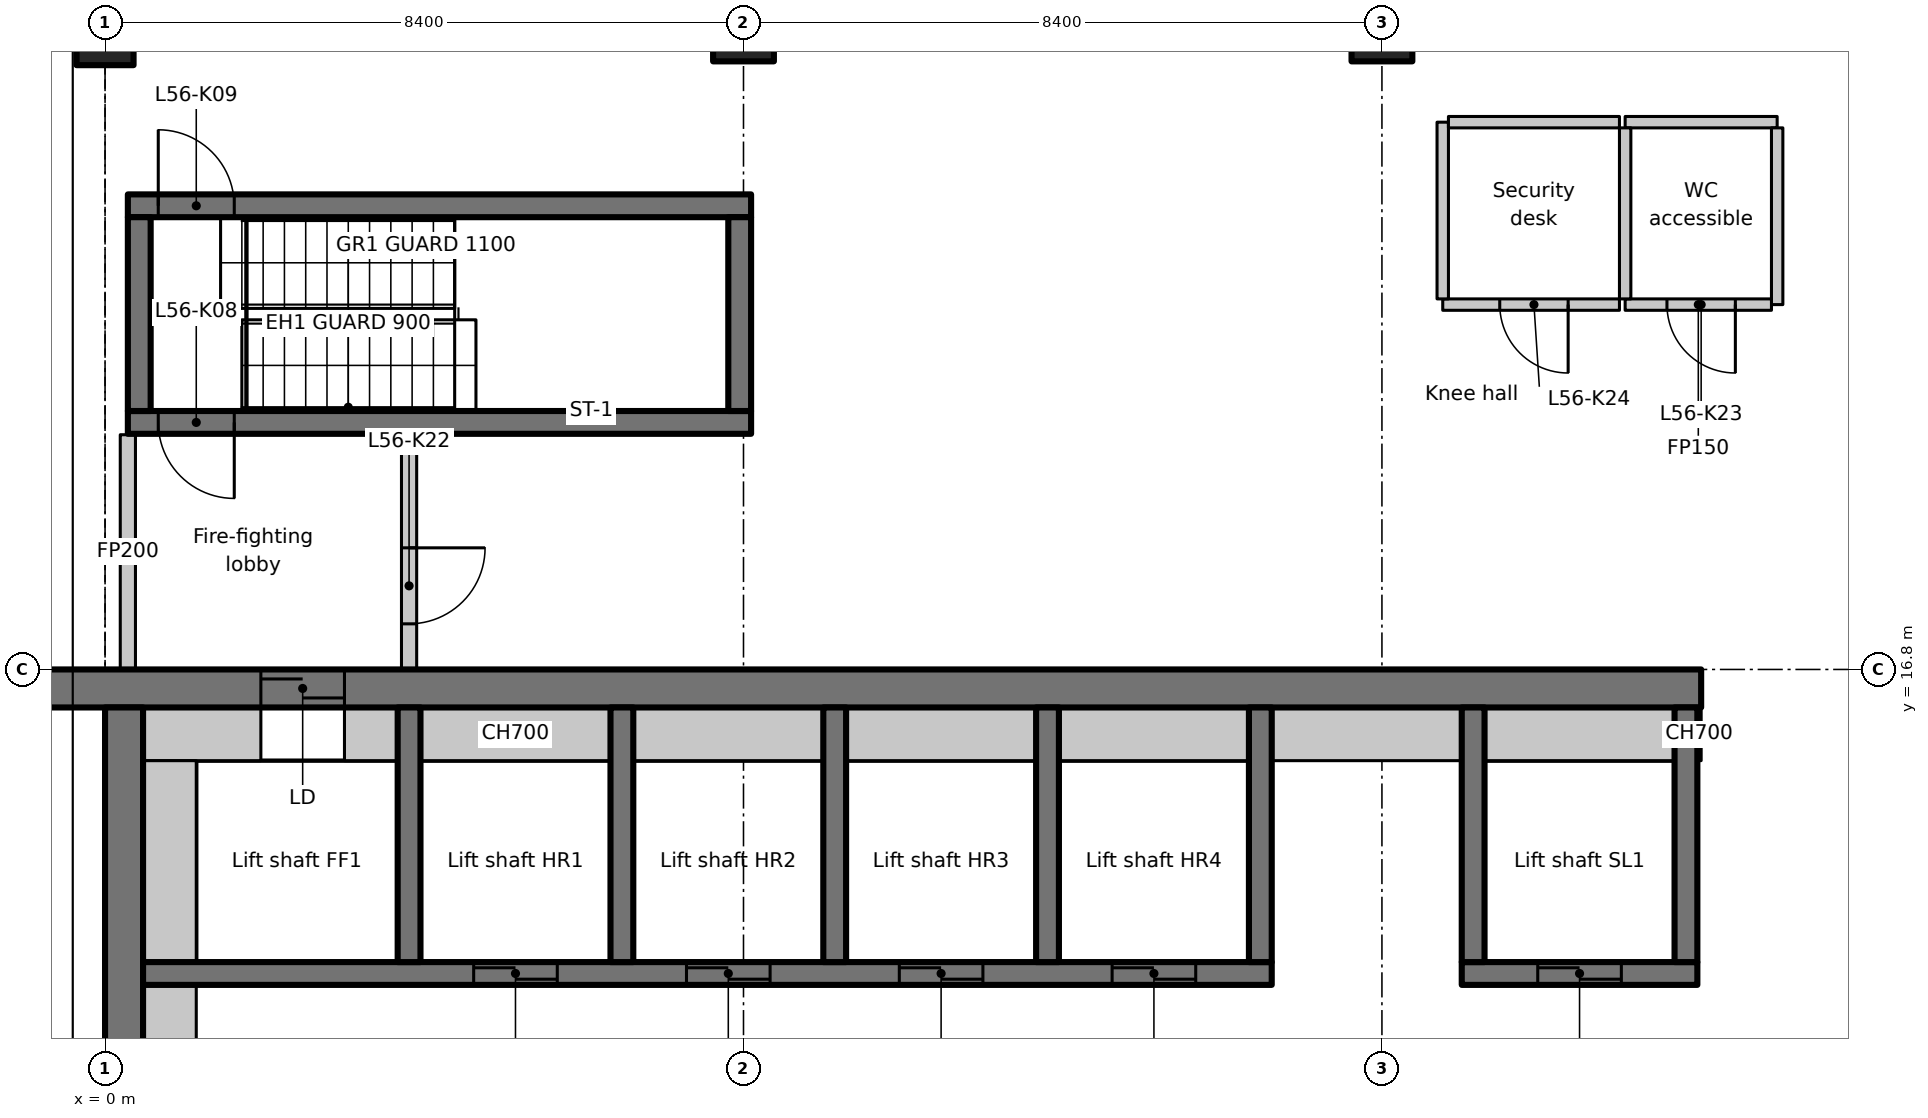
"""IFC4 building model, lengths in metres.
Left out: names, types, materials, properties, quantities, classifications, styles, units other than length and angle.
Written with IfcOpenShell. Run it as: python <this file> out.ifc"""

import sys

from ifc_helpers import new_model, si_unit, direction, frame, frame_2d, origin, origin_2d, place, context, subcontext, project, spatial, rectangle, extrude, element, fill, save


model = new_model("IFC4")
c1 = context("Model", 3, precision=1e-05, world=origin(), true_north=direction((0.0, 1.0)))
c2 = subcontext(c1, "Body", "Model", "MODEL_VIEW")
j1 = project(units=[si_unit("LENGTHUNIT", "METRE"), si_unit("PLANEANGLEUNIT", "RADIAN")], contexts=[c1])
p1 = place(None, origin())
s1 = spatial("IfcSite", under=j1, at=p1, CompositionType="ELEMENT")
p2 = place(p1, origin())
s2 = spatial("IfcBuilding", under=s1, at=p2, CompositionType="ELEMENT")
p3 = place(p2, frame((0.0, 0.0, 222.9)))
s3 = spatial("IfcBuildingStorey", under=s2, at=p3, CompositionType="ELEMENT", Elevation=222.9)
p4 = place(p3, frame((0.0, 25.2, 0.0), z_axis=(0.0, 0.0, 1.0), x_axis=(1.0, 0.0, 0.0)))
e1 = element("IfcColumn", 1, at=p4, inside=s3, PredefinedType="COLUMN", context=c2, shape_type="SweptSolid", body=[
    extrude(rectangle(XDim=0.75, YDim=0.9, at=origin_2d()), origin(), (0.0, 0.0, 1.0), 3.35),
])
for number, where, z_axis, x_axis in (
    (2, (8.4, 25.2, 0.0), (0.0, 0.0, 1.0), (1.0, 0.0, 0.0)),
    (3, (16.8, 25.2, 0.0), (0.0, 0.0, 1.0), (1.0, 0.0, 0.0)),
):
    element("IfcColumn", number, at=place(p3, frame(where, z_axis=z_axis, x_axis=x_axis)), inside=s3, PredefinedType="COLUMN", context=c2, shape_type="SweptSolid", body=[
        extrude(rectangle(XDim=0.8, YDim=0.8, at=origin_2d()), origin(), (0.0, 0.0, 1.0), 3.35),
    ])
p5 = place(p3, frame((-1.1, 16.55, 0.0), z_axis=(0.0, 0.0, 1.0), x_axis=(1.0, 0.0, 0.0)))
e4 = element("IfcWall", 4, at=p5, inside=s3, PredefinedType="SHEAR", context=c2, shape_type="SweptSolid", body=[
    extrude(rectangle(XDim=22.1, YDim=0.5, at=frame_2d((11.05, 0.0))), origin(), (0.0, 0.0, 1.0), 3.35),
])
p6 = place(p5, frame((3.15, 0.0, 0.0)))
e5 = element("IfcOpeningElement", 5, at=p6, cuts=e4, PredefinedType="OPENING", context=c2, shape_type="SweptSolid", body=[
    extrude(rectangle(XDim=1.1, YDim=2.3, at=frame_2d((0.55, 1.15))), frame((0.0, 0.26, 0.0), z_axis=(0.0, -1.0, 0.0), x_axis=(1.0, 0.0, 0.0)), (0.0, 0.0, 1.0), 0.52),
])
p7 = place(p3, frame((0.25, 7.436, 0.0), z_axis=(0.0, 0.0, 1.0), x_axis=(0.0, 1.0, 0.0)))
e6 = element("IfcWall", 6, at=p7, inside=s3, PredefinedType="SHEAR", context=c2, shape_type="SweptSolid", body=[
    extrude(rectangle(XDim=8.864, YDim=0.5, at=frame_2d((4.432, 0.0))), origin(), (0.0, 0.0, 1.0), 3.35),
])
p8 = place(p3, frame((0.5, 15.95, 0.0), z_axis=(0.0, 0.0, 1.0), x_axis=(1.0, 0.0, 0.0)))
e7 = element("IfcWall", 7, at=p8, inside=s3, PredefinedType="PARTITIONING", context=c2, shape_type="SweptSolid", body=[
    extrude(rectangle(XDim=1.55, YDim=0.7, at=frame_2d((0.775, 0.0))), origin(), (0.0, 0.0, 1.0), 3.35),
])
p9 = place(p3, frame((0.5, 12.8, 0.0), z_axis=(0.0, 0.0, 1.0), x_axis=(1.0, 0.0, 0.0)))
e8 = element("IfcWall", 8, at=p9, inside=s3, PredefinedType="SHEAR", context=c2, shape_type="SweptSolid", body=[
    extrude(rectangle(XDim=14.85, YDim=0.3, at=frame_2d((7.425, 0.0))), origin(), (0.0, 0.0, 1.0), 3.35),
])
p10 = place(p9, frame((4.35, 0.0, 0.0)))
e9 = element("IfcOpeningElement", 9, at=p10, cuts=e8, PredefinedType="OPENING", context=c2, shape_type="SweptSolid", body=[
    extrude(rectangle(XDim=1.1, YDim=2.3, at=frame_2d((0.55, 1.15))), frame((0.0, 0.16, 0.0), z_axis=(0.0, -1.0, 0.0), x_axis=(1.0, 0.0, 0.0)), (0.0, 0.0, 1.0), 0.32),
])
p11 = place(p9, frame((7.15, 0.0, 0.0)))
e10 = element("IfcOpeningElement", 10, at=p11, cuts=e8, PredefinedType="OPENING", context=c2, shape_type="SweptSolid", body=[
    extrude(rectangle(XDim=1.1, YDim=2.3, at=frame_2d((0.55, 1.15))), frame((0.0, 0.16, 0.0), z_axis=(0.0, -1.0, 0.0), x_axis=(1.0, 0.0, 0.0)), (0.0, 0.0, 1.0), 0.32),
])
p12 = place(p9, frame((9.95, 0.0, 0.0)))
e11 = element("IfcOpeningElement", 11, at=p12, cuts=e8, PredefinedType="OPENING", context=c2, shape_type="SweptSolid", body=[
    extrude(rectangle(XDim=1.1, YDim=2.3, at=frame_2d((0.55, 1.15))), frame((0.0, 0.16, 0.0), z_axis=(0.0, -1.0, 0.0), x_axis=(1.0, 0.0, 0.0)), (0.0, 0.0, 1.0), 0.32),
])
p13 = place(p9, frame((12.75, 0.0, 0.0)))
e12 = element("IfcOpeningElement", 12, at=p13, cuts=e8, PredefinedType="OPENING", context=c2, shape_type="SweptSolid", body=[
    extrude(rectangle(XDim=1.1, YDim=2.3, at=frame_2d((0.55, 1.15))), frame((0.0, 0.16, 0.0), z_axis=(0.0, -1.0, 0.0), x_axis=(1.0, 0.0, 0.0)), (0.0, 0.0, 1.0), 0.32),
])
for number, where, z_axis, x_axis in (
    (13, (4.0, 12.95, 0.0), (0.0, 0.0, 1.0), (0.0, 1.0, 0.0)),
    (14, (6.8, 12.95, 0.0), (0.0, 0.0, 1.0), (0.0, 1.0, 0.0)),
    (15, (9.6, 12.95, 0.0), (0.0, 0.0, 1.0), (0.0, 1.0, 0.0)),
    (16, (12.4, 12.95, 0.0), (0.0, 0.0, 1.0), (0.0, 1.0, 0.0)),
    (17, (15.2, 12.95, 0.0), (0.0, 0.0, 1.0), (0.0, 1.0, 0.0)),
):
    element("IfcWall", number, at=place(p3, frame(where, z_axis=z_axis, x_axis=x_axis)), inside=s3, PredefinedType="SHEAR", context=c2, shape_type="SweptSolid", body=[
        extrude(rectangle(XDim=3.35, YDim=0.3, at=frame_2d((1.675, 0.0))), origin(), (0.0, 0.0, 1.0), 3.35),
    ])
p14 = place(p3, frame((17.85, 12.8, 0.0), z_axis=(0.0, 0.0, 1.0), x_axis=(1.0, 0.0, 0.0)))
e18 = element("IfcWall", 18, at=p14, inside=s3, PredefinedType="SHEAR", context=c2, shape_type="SweptSolid", body=[
    extrude(rectangle(XDim=3.1, YDim=0.3, at=frame_2d((1.55, 0.0))), origin(), (0.0, 0.0, 1.0), 3.35),
])
p15 = place(p14, frame((1.0, 0.0, 0.0)))
e19 = element("IfcOpeningElement", 19, at=p15, cuts=e18, PredefinedType="OPENING", context=c2, shape_type="SweptSolid", body=[
    extrude(rectangle(XDim=1.1, YDim=2.3, at=frame_2d((0.55, 1.15))), frame((0.0, 0.16, 0.0), z_axis=(0.0, -1.0, 0.0), x_axis=(1.0, 0.0, 0.0)), (0.0, 0.0, 1.0), 0.32),
])
for number, where, z_axis, x_axis in (
    (20, (18.0, 12.95, 0.0), (0.0, 0.0, 1.0), (0.0, 1.0, 0.0)),
    (21, (20.8, 12.95, 0.0), (0.0, 0.0, 1.0), (0.0, 1.0, 0.0)),
):
    element("IfcWall", number, at=place(p3, frame(where, z_axis=z_axis, x_axis=x_axis)), inside=s3, PredefinedType="SHEAR", context=c2, shape_type="SweptSolid", body=[
        extrude(rectangle(XDim=3.35, YDim=0.3, at=frame_2d((1.675, 0.0))), origin(), (0.0, 0.0, 1.0), 3.35),
    ])
p16 = place(p3, frame((8.5, 20.05, 0.0), z_axis=(0.0, 0.0, 1.0), x_axis=(-1.0, 0.0, 0.0)))
e22 = element("IfcWall", 22, at=p16, inside=s3, PredefinedType="SHEAR", context=c2, shape_type="SweptSolid", body=[
    extrude(rectangle(XDim=8.2, YDim=0.3, at=frame_2d((4.1, 0.0))), origin(), (0.0, 0.0, 1.0), 3.35),
])
p17 = place(p16, frame((6.8, 0.0, 0.0)))
e23 = element("IfcOpeningElement", 23, at=p17, cuts=e22, PredefinedType="OPENING", context=c2, shape_type="SweptSolid", body=[
    extrude(rectangle(XDim=1.0, YDim=2.1, at=frame_2d((0.5, 1.05))), frame((0.0, 0.16, 0.0), z_axis=(0.0, -1.0, 0.0), x_axis=(1.0, 0.0, 0.0)), (0.0, 0.0, 1.0), 0.32),
])
p18 = place(p3, frame((0.3, 22.9, 0.0), z_axis=(0.0, 0.0, 1.0), x_axis=(1.0, 0.0, 0.0)))
e24 = element("IfcWall", 24, at=p18, inside=s3, PredefinedType="SHEAR", context=c2, shape_type="SweptSolid", body=[
    extrude(rectangle(XDim=8.2, YDim=0.3, at=frame_2d((4.1, 0.0))), origin(), (0.0, 0.0, 1.0), 3.35),
])
p19 = place(p18, frame((0.4, 0.0, 0.0)))
e25 = element("IfcOpeningElement", 25, at=p19, cuts=e24, PredefinedType="OPENING", context=c2, shape_type="SweptSolid", body=[
    extrude(rectangle(XDim=1.0, YDim=2.1, at=frame_2d((0.5, 1.05))), frame((0.0, 0.16, 0.0), z_axis=(0.0, -1.0, 0.0), x_axis=(1.0, 0.0, 0.0)), (0.0, 0.0, 1.0), 0.32),
])
for number, where, z_axis, x_axis in (
    (26, (0.45, 20.2, 0.0), (0.0, 0.0, 1.0), (0.0, 1.0, 0.0)),
    (27, (8.35, 20.2, 0.0), (0.0, 0.0, 1.0), (0.0, 1.0, 0.0)),
):
    element("IfcWall", number, at=place(p3, frame(where, z_axis=z_axis, x_axis=x_axis)), inside=s3, PredefinedType="SHEAR", context=c2, shape_type="SweptSolid", body=[
        extrude(rectangle(XDim=2.55, YDim=0.3, at=frame_2d((1.275, 0.0))), origin(), (0.0, 0.0, 1.0), 3.35),
    ])
p20 = place(p3, frame((0.3, 16.812, 0.0), z_axis=(0.0, 0.0, 1.0), x_axis=(0.0, 1.0, 0.0)))
e28 = element("IfcWall", 28, at=p20, inside=s3, PredefinedType="PARTITIONING", context=c2, shape_type="SweptSolid", body=[
    extrude(rectangle(XDim=3.076, YDim=0.2, at=frame_2d((1.538, 0.0))), origin(), (0.0, 0.0, 1.0), 2.98),
])
p21 = place(p3, frame((4.0, 19.888, 0.0), z_axis=(0.0, 0.0, 1.0), x_axis=(0.0, -1.0, 0.0)))
e29 = element("IfcWall", 29, at=p21, inside=s3, PredefinedType="PARTITIONING", context=c2, shape_type="SweptSolid", body=[
    extrude(rectangle(XDim=3.076, YDim=0.2, at=frame_2d((1.538, 0.0))), origin(), (0.0, 0.0, 1.0), 3.35),
])
p22 = place(p21, frame((1.488, 0.0, 0.0)))
e30 = element("IfcOpeningElement", 30, at=p22, cuts=e29, PredefinedType="OPENING", context=c2, shape_type="SweptSolid", body=[
    extrude(rectangle(XDim=1.0, YDim=2.1, at=frame_2d((0.5, 1.05))), frame((0.0, 0.11, 0.0), z_axis=(0.0, -1.0, 0.0), x_axis=(1.0, 0.0, 0.0)), (0.0, 0.0, 1.0), 0.22),
])
p23 = place(p3, frame((20.0, 24.0, 0.0), z_axis=(0.0, 0.0, 1.0), x_axis=(1.0, 0.0, 0.0)))
e31 = element("IfcWall", 31, at=p23, inside=s3, PredefinedType="PARTITIONING", context=c2, shape_type="SweptSolid", body=[
    extrude(rectangle(XDim=2.0, YDim=0.15, at=frame_2d((1.0, 0.0))), origin(), (0.0, 0.0, 1.0), 3.35),
])
p24 = place(p3, frame((22.0, 23.925, 0.0), z_axis=(0.0, 0.0, 1.0), x_axis=(0.0, -1.0, 0.0)))
e32 = element("IfcWall", 32, at=p24, inside=s3, PredefinedType="PARTITIONING", context=c2, shape_type="SweptSolid", body=[
    extrude(rectangle(XDim=2.325, YDim=0.15, at=frame_2d((1.163, 0.0))), origin(), (0.0, 0.0, 1.0), 3.35),
])
p25 = place(p3, frame((21.925, 21.6, 0.0), z_axis=(0.0, 0.0, 1.0), x_axis=(-1.0, 0.0, 0.0)))
e33 = element("IfcWall", 33, at=p25, inside=s3, PredefinedType="PARTITIONING", context=c2, shape_type="SweptSolid", body=[
    extrude(rectangle(XDim=1.925, YDim=0.15, at=frame_2d((0.962, 0.0))), origin(), (0.0, 0.0, 1.0), 3.35),
])
p26 = place(p25, frame((0.475, 0.0, 0.0)))
e34 = element("IfcOpeningElement", 34, at=p26, cuts=e33, PredefinedType="OPENING", context=c2, shape_type="SweptSolid", body=[
    extrude(rectangle(XDim=0.9, YDim=2.1, at=frame_2d((0.45, 1.05))), frame((0.0, 0.085, 0.0), z_axis=(0.0, -1.0, 0.0), x_axis=(1.0, 0.0, 0.0)), (0.0, 0.0, 1.0), 0.17),
])
p27 = place(p3, frame((20.0, 21.675, 0.0), z_axis=(0.0, 0.0, 1.0), x_axis=(0.0, 1.0, 0.0)))
e35 = element("IfcWall", 35, at=p27, inside=s3, PredefinedType="PARTITIONING", context=c2, shape_type="SweptSolid", body=[
    extrude(rectangle(XDim=2.25, YDim=0.15, at=frame_2d((1.125, 0.0))), origin(), (0.0, 0.0, 1.0), 3.35),
])
p28 = place(p3, frame((19.925, 21.6, 0.0), z_axis=(0.0, 0.0, 1.0), x_axis=(-1.0, 0.0, 0.0)))
e36 = element("IfcWall", 36, at=p28, inside=s3, PredefinedType="PARTITIONING", context=c2, shape_type="SweptSolid", body=[
    extrude(rectangle(XDim=2.325, YDim=0.15, at=frame_2d((1.163, 0.0))), origin(), (0.0, 0.0, 1.0), 3.35),
])
p29 = place(p28, frame((0.675, 0.0, 0.0)))
e37 = element("IfcOpeningElement", 37, at=p29, cuts=e36, PredefinedType="OPENING", context=c2, shape_type="SweptSolid", body=[
    extrude(rectangle(XDim=0.9, YDim=2.1, at=frame_2d((0.45, 1.05))), frame((0.0, 0.085, 0.0), z_axis=(0.0, -1.0, 0.0), x_axis=(1.0, 0.0, 0.0)), (0.0, 0.0, 1.0), 0.17),
])
p30 = place(p3, frame((17.6, 21.675, 0.0), z_axis=(0.0, 0.0, 1.0), x_axis=(0.0, 1.0, 0.0)))
e38 = element("IfcWall", 38, at=p30, inside=s3, PredefinedType="PARTITIONING", context=c2, shape_type="SweptSolid", body=[
    extrude(rectangle(XDim=2.325, YDim=0.15, at=frame_2d((1.163, 0.0))), origin(), (0.0, 0.0, 1.0), 3.35),
])
p31 = place(p3, frame((17.675, 24.0, 0.0), z_axis=(0.0, 0.0, 1.0), x_axis=(1.0, 0.0, 0.0)))
e39 = element("IfcWall", 39, at=p31, inside=s3, PredefinedType="PARTITIONING", context=c2, shape_type="SweptSolid", body=[
    extrude(rectangle(XDim=2.25, YDim=0.15, at=frame_2d((1.125, 0.0))), origin(), (0.0, 0.0, 1.0), 3.35),
])
p32 = place(p3, frame((0.85, 7.436, 0.0), z_axis=(0.0, 0.0, 1.0), x_axis=(0.0, 1.0, 0.0)))
e40 = element("IfcWall", 40, at=p32, inside=s3, PredefinedType="PARTITIONING", context=c2, shape_type="SweptSolid", body=[
    extrude(rectangle(XDim=5.214, YDim=0.7, at=frame_2d((2.607, 0.0))), origin(), (0.0, 0.0, 1.0), 3.35),
])
p33 = place(p3, frame((0.85, 12.95, 0.0), z_axis=(0.0, 0.0, 1.0), x_axis=(0.0, 1.0, 0.0)))
e41 = element("IfcWall", 41, at=p33, inside=s3, PredefinedType="PARTITIONING", context=c2, shape_type="SweptSolid", body=[
    extrude(rectangle(XDim=2.65, YDim=0.7, at=frame_2d((1.325, 0.0))), origin(), (0.0, 0.0, 1.0), 3.35),
])
p34 = place(p3, frame((3.15, 15.95, 0.0), z_axis=(0.0, 0.0, 1.0), x_axis=(1.0, 0.0, 0.0)))
e42 = element("IfcWall", 42, at=p34, inside=s3, PredefinedType="PARTITIONING", context=c2, shape_type="SweptSolid", body=[
    extrude(rectangle(XDim=0.7, YDim=0.7, at=frame_2d((0.35, 0.0))), origin(), (0.0, 0.0, 1.0), 3.35),
])
for number, where, z_axis, x_axis in (
    (43, (4.15, 15.95, 0.0), (0.0, 0.0, 1.0), (1.0, 0.0, 0.0)),
    (44, (6.95, 15.95, 0.0), (0.0, 0.0, 1.0), (1.0, 0.0, 0.0)),
    (45, (9.75, 15.95, 0.0), (0.0, 0.0, 1.0), (1.0, 0.0, 0.0)),
    (46, (12.55, 15.95, 0.0), (0.0, 0.0, 1.0), (1.0, 0.0, 0.0)),
    (47, (15.35, 15.95, 0.0), (0.0, 0.0, 1.0), (1.0, 0.0, 0.0)),
    (48, (18.15, 15.95, 0.0), (0.0, 0.0, 1.0), (1.0, 0.0, 0.0)),
):
    element("IfcWall", number, at=place(p3, frame(where, z_axis=z_axis, x_axis=x_axis)), inside=s3, PredefinedType="PARTITIONING", context=c2, shape_type="SweptSolid", body=[
        extrude(rectangle(XDim=2.5, YDim=0.7, at=frame_2d((1.25, 0.0))), origin(), (0.0, 0.0, 1.0), 3.35),
    ])
p35 = place(p3, frame((20.95, 15.95, 0.0), z_axis=(0.0, 0.0, 1.0), x_axis=(1.0, 0.0, 0.0)))
e49 = element("IfcWall", 49, at=p35, inside=s3, PredefinedType="PARTITIONING", context=c2, shape_type="SweptSolid", body=[
    extrude(rectangle(XDim=0.05, YDim=0.7, at=frame_2d((0.025, 0.0))), origin(), (0.0, 0.0, 1.0), 3.35),
])
p36 = place(p6, origin())
e50 = element("IfcDoor", 50, at=p36, inside=s3, OperationType="SLIDING_TO_LEFT", PredefinedType="DOOR", context=c2, shape_type="SweptSolid", body=[
    extrude(rectangle(XDim=1.1, YDim=2.3, at=frame_2d((0.55, 1.15))), frame((0.0, 0.025, 0.0), z_axis=(0.0, -1.0, 0.0), x_axis=(1.0, 0.0, 0.0)), (0.0, 0.0, 1.0), 0.05),
])
fill(e5, e50)
p37 = place(p10, origin())
e51 = element("IfcDoor", 51, at=p37, inside=s3, OperationType="SLIDING_TO_LEFT", PredefinedType="DOOR", context=c2, shape_type="SweptSolid", body=[
    extrude(rectangle(XDim=1.1, YDim=2.3, at=frame_2d((0.55, 1.15))), frame((0.0, 0.025, 0.0), z_axis=(0.0, -1.0, 0.0), x_axis=(1.0, 0.0, 0.0)), (0.0, 0.0, 1.0), 0.05),
])
fill(e9, e51)
p38 = place(p11, origin())
e52 = element("IfcDoor", 52, at=p38, inside=s3, OperationType="SLIDING_TO_LEFT", PredefinedType="DOOR", context=c2, shape_type="SweptSolid", body=[
    extrude(rectangle(XDim=1.1, YDim=2.3, at=frame_2d((0.55, 1.15))), frame((0.0, 0.025, 0.0), z_axis=(0.0, -1.0, 0.0), x_axis=(1.0, 0.0, 0.0)), (0.0, 0.0, 1.0), 0.05),
])
fill(e10, e52)
p39 = place(p12, origin())
e53 = element("IfcDoor", 53, at=p39, inside=s3, OperationType="SLIDING_TO_LEFT", PredefinedType="DOOR", context=c2, shape_type="SweptSolid", body=[
    extrude(rectangle(XDim=1.1, YDim=2.3, at=frame_2d((0.55, 1.15))), frame((0.0, 0.025, 0.0), z_axis=(0.0, -1.0, 0.0), x_axis=(1.0, 0.0, 0.0)), (0.0, 0.0, 1.0), 0.05),
])
fill(e11, e53)
p40 = place(p13, origin())
e54 = element("IfcDoor", 54, at=p40, inside=s3, OperationType="SLIDING_TO_LEFT", PredefinedType="DOOR", context=c2, shape_type="SweptSolid", body=[
    extrude(rectangle(XDim=1.1, YDim=2.3, at=frame_2d((0.55, 1.15))), frame((0.0, 0.025, 0.0), z_axis=(0.0, -1.0, 0.0), x_axis=(1.0, 0.0, 0.0)), (0.0, 0.0, 1.0), 0.05),
])
fill(e12, e54)
p41 = place(p15, origin())
e55 = element("IfcDoor", 55, at=p41, inside=s3, OperationType="SLIDING_TO_LEFT", PredefinedType="DOOR", context=c2, shape_type="SweptSolid", body=[
    extrude(rectangle(XDim=1.1, YDim=2.3, at=frame_2d((0.55, 1.15))), frame((0.0, 0.025, 0.0), z_axis=(0.0, -1.0, 0.0), x_axis=(1.0, 0.0, 0.0)), (0.0, 0.0, 1.0), 0.05),
])
fill(e19, e55)
p42 = place(p17, origin())
e56 = element("IfcDoor", 56, at=p42, inside=s3, OperationType="SINGLE_SWING_LEFT", PredefinedType="DOOR", context=c2, shape_type="SweptSolid", body=[
    extrude(rectangle(XDim=1.0, YDim=2.1, at=frame_2d((0.5, 1.05))), frame((0.0, 0.025, 0.0), z_axis=(0.0, -1.0, 0.0), x_axis=(1.0, 0.0, 0.0)), (0.0, 0.0, 1.0), 0.05),
])
fill(e23, e56)
p43 = place(p19, origin())
e57 = element("IfcDoor", 57, at=p43, inside=s3, OperationType="SINGLE_SWING_RIGHT", PredefinedType="DOOR", context=c2, shape_type="SweptSolid", body=[
    extrude(rectangle(XDim=1.0, YDim=2.1, at=frame_2d((0.5, 1.05))), frame((0.0, 0.025, 0.0), z_axis=(0.0, -1.0, 0.0), x_axis=(1.0, 0.0, 0.0)), (0.0, 0.0, 1.0), 0.05),
])
fill(e25, e57)
p44 = place(p22, origin())
e58 = element("IfcDoor", 58, at=p44, inside=s3, OperationType="SINGLE_SWING_LEFT", PredefinedType="DOOR", context=c2, shape_type="SweptSolid", body=[
    extrude(rectangle(XDim=1.0, YDim=2.1, at=frame_2d((0.5, 1.05))), frame((0.0, 0.025, 0.0), z_axis=(0.0, -1.0, 0.0), x_axis=(1.0, 0.0, 0.0)), (0.0, 0.0, 1.0), 0.05),
])
fill(e30, e58)
p45 = place(p26, origin())
e59 = element("IfcDoor", 59, at=p45, inside=s3, OperationType="SINGLE_SWING_RIGHT", PredefinedType="DOOR", context=c2, shape_type="SweptSolid", body=[
    extrude(rectangle(XDim=0.9, YDim=2.1, at=frame_2d((0.45, 1.05))), frame((0.0, 0.025, 0.0), z_axis=(0.0, -1.0, 0.0), x_axis=(1.0, 0.0, 0.0)), (0.0, 0.0, 1.0), 0.05),
])
fill(e34, e59)
p46 = place(p29, origin())
e60 = element("IfcDoor", 60, at=p46, inside=s3, OperationType="SINGLE_SWING_LEFT", PredefinedType="DOOR", context=c2, shape_type="SweptSolid", body=[
    extrude(rectangle(XDim=0.9, YDim=2.1, at=frame_2d((0.45, 1.05))), frame((0.0, 0.025, 0.0), z_axis=(0.0, -1.0, 0.0), x_axis=(1.0, 0.0, 0.0)), (0.0, 0.0, 1.0), 0.05),
])
fill(e37, e60)
save(model, sys.argv[1])
